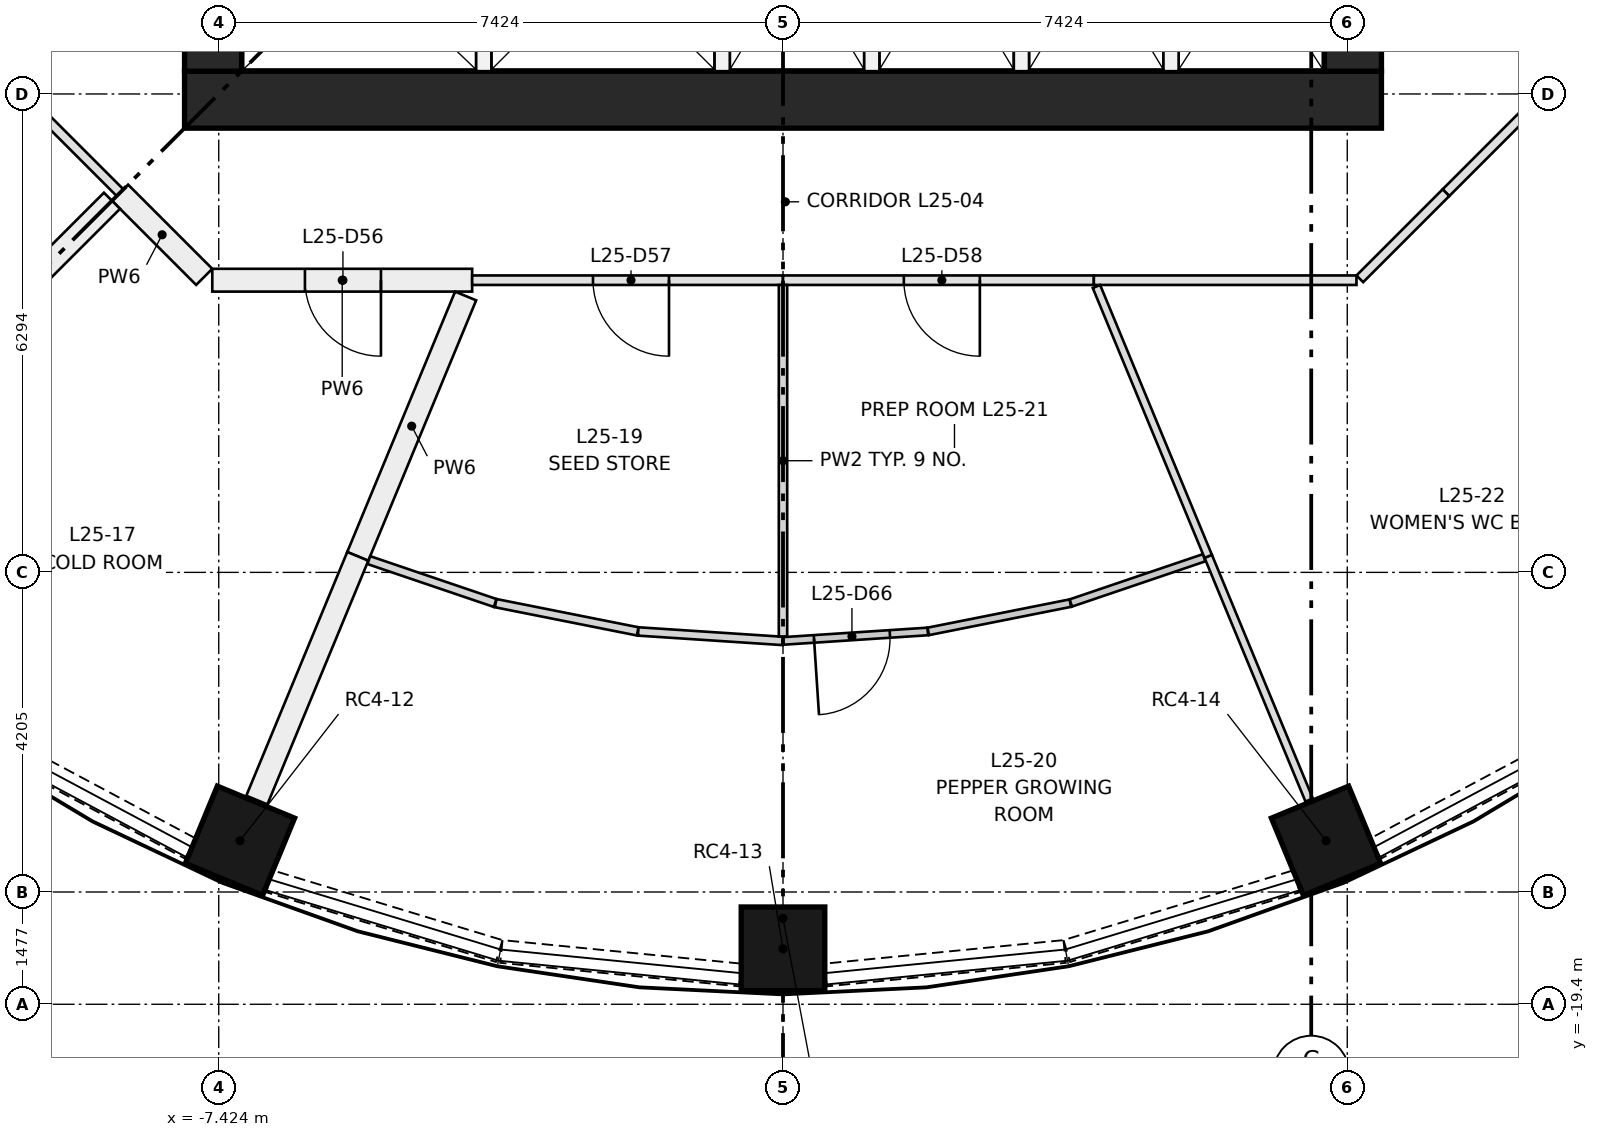
"""IFC4 building model, lengths in metres.
Left out: names, types, materials, properties, quantities, classifications, styles, units other than length and angle.
Written with IfcOpenShell. Run it as: python <this file> out.ifc"""

import sys

from ifc_helpers import new_model, si_unit, direction, frame, frame_2d, origin, origin_2d, place, context, subcontext, project, spatial, rectangle, extrude, element, fill, save


model = new_model("IFC4")
c1 = context("Model", 3, precision=1e-05, world=origin(), true_north=direction((0.0, 1.0)))
c2 = subcontext(c1, "Body", "Model", "MODEL_VIEW")
j1 = project(units=[si_unit("LENGTHUNIT", "METRE"), si_unit("PLANEANGLEUNIT", "RADIAN")], contexts=[c1])
p1 = place(None, origin())
s1 = spatial("IfcSite", under=j1, at=p1, CompositionType="ELEMENT")
p2 = place(p1, origin())
s2 = spatial("IfcBuilding", under=s1, at=p2, CompositionType="ELEMENT")
p3 = place(p2, frame((0.0, 0.0, 98.3)))
s3 = spatial("IfcBuildingStorey", under=s2, at=p3, CompositionType="ELEMENT", Elevation=98.3)
for number, where, z_axis, x_axis in (
    (1, (-7.145, -17.249, 0.0), (0.0, 0.0, 1.0), (-0.383, -0.924, 0.0)),
    (2, (0.0, -18.67, 0.0), (0.0, 0.0, 1.0), (0.0, -1.0, 0.0)),
    (3, (7.145, -17.249, 0.0), (0.0, 0.0, 1.0), (0.383, -0.924, 0.0)),
):
    element("IfcColumn", number, at=place(p3, frame(where, z_axis=z_axis, x_axis=x_axis)), inside=s3, PredefinedType="COLUMN", context=c2, shape_type="SweptSolid", body=[
        extrude(rectangle(XDim=1.1, YDim=1.1, at=origin_2d()), origin(), (0.0, 0.0, 1.0), 3.65),
    ])
p4 = place(p3, frame((-7.874, -7.499, 0.0), z_axis=(0.0, 0.0, 1.0), x_axis=(1.0, 0.0, 0.0)))
e4 = element("IfcWall", 4, at=p4, inside=s3, PredefinedType="SHEAR", context=c2, shape_type="SweptSolid", body=[
    extrude(rectangle(XDim=15.748, YDim=0.75, at=frame_2d((7.874, 0.0))), origin(), (0.0, 0.0, 1.0), 3.65),
])
p5 = place(p3, frame((-7.499, -7.124, 0.0), z_axis=(0.0, 0.0, 1.0), x_axis=(0.0, 1.0, 0.0)))
e5 = element("IfcWall", 5, at=p5, inside=s3, PredefinedType="SHEAR", context=c2, shape_type="SweptSolid", body=[
    extrude(rectangle(XDim=14.248, YDim=0.75, at=frame_2d((7.124, 0.0))), origin(), (0.0, 0.0, 1.0), 3.65),
])
p6 = place(p5, frame((6.624, 0.0, 0.0)))
e6 = element("IfcOpeningElement", 6, at=p6, cuts=e5, PredefinedType="OPENING", context=c2, shape_type="SweptSolid", body=[
    extrude(rectangle(XDim=1.0, YDim=2.1, at=frame_2d((0.5, 1.05))), frame((0.0, 0.385, 0.0), z_axis=(0.0, -1.0, 0.0), x_axis=(1.0, 0.0, 0.0)), (0.0, 0.0, 1.0), 0.77),
])
p7 = place(p5, frame((3.5, 0.0, 0.0)))
e7 = element("IfcOpeningElement", 7, at=p7, cuts=e5, PredefinedType="OPENING", context=c2, shape_type="SweptSolid", body=[
    extrude(rectangle(XDim=1.8, YDim=2.1, at=frame_2d((0.9, 1.05))), frame((0.0, 0.385, 0.0), z_axis=(0.0, -1.0, 0.0), x_axis=(1.0, 0.0, 0.0)), (0.0, 0.0, 1.0), 0.77),
])
p8 = place(p5, frame((8.948, 0.0, 0.0)))
e8 = element("IfcOpeningElement", 8, at=p8, cuts=e5, PredefinedType="OPENING", context=c2, shape_type="SweptSolid", body=[
    extrude(rectangle(XDim=1.8, YDim=2.1, at=frame_2d((0.9, 1.05))), frame((0.0, 0.385, 0.0), z_axis=(0.0, -1.0, 0.0), x_axis=(1.0, 0.0, 0.0)), (0.0, 0.0, 1.0), 0.77),
])
p9 = place(p5, frame((12.124, 0.0, 0.0)))
e9 = element("IfcOpeningElement", 9, at=p9, cuts=e5, PredefinedType="OPENING", context=c2, shape_type="SweptSolid", body=[
    extrude(rectangle(XDim=1.0, YDim=2.1, at=frame_2d((0.5, 1.05))), frame((0.0, 0.385, 0.0), z_axis=(0.0, -1.0, 0.0), x_axis=(1.0, 0.0, 0.0)), (0.0, 0.0, 1.0), 0.77),
])
p10 = place(p3, frame((7.499, -7.124, 0.0), z_axis=(0.0, 0.0, 1.0), x_axis=(0.0, 1.0, 0.0)))
e10 = element("IfcWall", 10, at=p10, inside=s3, PredefinedType="SHEAR", context=c2, shape_type="SweptSolid", body=[
    extrude(rectangle(XDim=14.248, YDim=0.75, at=frame_2d((7.124, 0.0))), origin(), (0.0, 0.0, 1.0), 3.65),
])
p11 = place(p10, frame((6.624, 0.0, 0.0)))
e11 = element("IfcOpeningElement", 11, at=p11, cuts=e10, PredefinedType="OPENING", context=c2, shape_type="SweptSolid", body=[
    extrude(rectangle(XDim=1.0, YDim=2.1, at=frame_2d((0.5, 1.05))), frame((0.0, 0.385, 0.0), z_axis=(0.0, -1.0, 0.0), x_axis=(1.0, 0.0, 0.0)), (0.0, 0.0, 1.0), 0.77),
])
p12 = place(p10, frame((3.5, 0.0, 0.0)))
e12 = element("IfcOpeningElement", 12, at=p12, cuts=e10, PredefinedType="OPENING", context=c2, shape_type="SweptSolid", body=[
    extrude(rectangle(XDim=1.8, YDim=2.1, at=frame_2d((0.9, 1.05))), frame((0.0, 0.385, 0.0), z_axis=(0.0, -1.0, 0.0), x_axis=(1.0, 0.0, 0.0)), (0.0, 0.0, 1.0), 0.77),
])
p13 = place(p10, frame((8.948, 0.0, 0.0)))
e13 = element("IfcOpeningElement", 13, at=p13, cuts=e10, PredefinedType="OPENING", context=c2, shape_type="SweptSolid", body=[
    extrude(rectangle(XDim=1.8, YDim=2.1, at=frame_2d((0.9, 1.05))), frame((0.0, 0.385, 0.0), z_axis=(0.0, -1.0, 0.0), x_axis=(1.0, 0.0, 0.0)), (0.0, 0.0, 1.0), 0.77),
])
for number, where, z_axis, x_axis in (
    (14, (-3.937, -7.124, 0.0), (0.0, 0.0, 1.0), (0.0, 1.0, 0.0)),
    (15, (-0.8, -7.124, 0.0), (0.0, 0.0, 1.0), (0.0, 1.0, 0.0)),
    (16, (1.168, -7.124, 0.0), (0.0, 0.0, 1.0), (0.0, 1.0, 0.0)),
    (17, (3.137, -7.124, 0.0), (0.0, 0.0, 1.0), (0.0, 1.0, 0.0)),
    (18, (5.105, -7.124, 0.0), (0.0, 0.0, 1.0), (0.0, 1.0, 0.0)),
):
    element("IfcWall", number, at=place(p3, frame(where, z_axis=z_axis, x_axis=x_axis)), inside=s3, PredefinedType="PARTITIONING", context=c2, shape_type="SweptSolid", body=[
        extrude(rectangle(XDim=2.95, YDim=0.2, at=frame_2d((1.475, 0.0))), origin(), (0.0, 0.0, 1.0), 3.3),
    ])
p14 = place(p3, frame((-10.582, -15.863, 0.0), z_axis=(0.0, 0.0, 1.0), x_axis=(0.882005928597, -0.471238306932, 0.0)))
e19 = element("IfcWall", 19, at=p14, inside=s3, PredefinedType="SOLIDWALL", context=c2, shape_type="SweptSolid", body=[
    extrude(rectangle(XDim=3.157, YDim=0.3, at=frame_2d((1.579, 0.0))), origin(), (0.0, 0.0, 1.0), 0.9),
])
p15 = place(p3, frame((-6.756, -17.782, 0.0), z_axis=(0.0, 0.0, 1.0), x_axis=(0.956874051907, -0.290503096001, 0.0)))
e20 = element("IfcWall", 20, at=p15, inside=s3, PredefinedType="SOLIDWALL", context=c2, shape_type="SweptSolid", body=[
    extrude(rectangle(XDim=3.157, YDim=0.3, at=frame_2d((1.579, 0.0))), origin(), (0.0, 0.0, 1.0), 0.9),
])
for number, where, z_axis, x_axis in (
    (21, (-3.705, -18.706, 0.0), (0.0, 0.0, 1.0), (0.995, -0.098, 0.0)),
    (22, (0.564, -19.014, 0.0), (0.0, 0.0, 1.0), (0.995, 0.098, 0.0)),
):
    element("IfcWall", number, at=place(p3, frame(where, z_axis=z_axis, x_axis=x_axis)), inside=s3, PredefinedType="SOLIDWALL", context=c2, shape_type="SweptSolid", body=[
        extrude(rectangle(XDim=3.156, YDim=0.3, at=frame_2d((1.578, 0.0))), origin(), (0.0, 0.0, 1.0), 0.9),
    ])
p16 = place(p3, frame((3.734, -18.7, 0.0), z_axis=(0.0, 0.0, 1.0), x_axis=(0.956874051907, 0.290503096001, 0.0)))
e23 = element("IfcWall", 23, at=p16, inside=s3, PredefinedType="SOLIDWALL", context=c2, shape_type="SweptSolid", body=[
    extrude(rectangle(XDim=3.157, YDim=0.3, at=frame_2d((1.579, 0.0))), origin(), (0.0, 0.0, 1.0), 0.9),
])
p17 = place(p3, frame((7.797, -17.351, 0.0), z_axis=(0.0, 0.0, 1.0), x_axis=(0.882005928597, 0.471238306932, 0.0)))
e24 = element("IfcWall", 24, at=p17, inside=s3, PredefinedType="SOLIDWALL", context=c2, shape_type="SweptSolid", body=[
    extrude(rectangle(XDim=3.157, YDim=0.3, at=frame_2d((1.579, 0.0))), origin(), (0.0, 0.0, 1.0), 0.9),
])
for number, where, z_axis, x_axis in (
    (25, (9.856, -7.589, 0.0), (0.0, 0.0, 1.0), (-0.707, -0.707, 0.0)),
    (26, (-8.722, -8.722, 0.0), (0.0, 0.0, 1.0), (-0.707, 0.707, 0.0)),
):
    element("IfcWall", number, at=place(p3, frame(where, z_axis=z_axis, x_axis=x_axis)), inside=s3, PredefinedType="PARTITIONING", context=c2, shape_type="SweptSolid", body=[
        extrude(rectangle(XDim=1.603, YDim=0.125, at=frame_2d((0.801, 0.0))), origin(), (0.0, 0.0, 1.0), 3.3),
    ])
p18 = place(p3, frame((-7.615, -9.83, 0.0), z_axis=(0.0, 0.0, 1.0), x_axis=(-0.707028841614, 0.70718471217, 0.0)))
e27 = element("IfcWall", 27, at=p18, inside=s3, PredefinedType="PARTITIONING", context=c2, shape_type="SweptSolid", body=[
    extrude(rectangle(XDim=1.566, YDim=0.3, at=frame_2d((0.783, 0.0))), origin(), (0.0, 0.0, 1.0), 3.3),
])
p19 = place(p3, frame((-4.09, -9.874, 0.0), z_axis=(0.0, 0.0, 1.0), x_axis=(-1.0, 0.0, 0.0)))
e28 = element("IfcWall", 28, at=p19, inside=s3, PredefinedType="PARTITIONING", context=c2, shape_type="SweptSolid", body=[
    extrude(rectangle(XDim=3.419, YDim=0.3, at=frame_2d((1.709, 0.0))), origin(), (0.0, 0.0, 1.0), 3.3),
])
p20 = place(p19, frame((1.2, 0.0, 0.0)))
e29 = element("IfcOpeningElement", 29, at=p20, cuts=e28, PredefinedType="OPENING", context=c2, shape_type="SweptSolid", body=[
    extrude(rectangle(XDim=1.0, YDim=2.1, at=frame_2d((0.5, 1.05))), frame((0.0, 0.16, 0.0), z_axis=(0.0, -1.0, 0.0), x_axis=(1.0, 0.0, 0.0)), (0.0, 0.0, 1.0), 0.32),
])
p21 = place(p3, frame((0.0, -9.874, 0.0), z_axis=(0.0, 0.0, 1.0), x_axis=(-1.0, 0.0, 0.0)))
e30 = element("IfcWall", 30, at=p21, inside=s3, PredefinedType="PARTITIONING", context=c2, shape_type="SweptSolid", body=[
    extrude(rectangle(XDim=4.09, YDim=0.125, at=frame_2d((2.045, 0.0))), origin(), (0.0, 0.0, 1.0), 3.3),
])
p22 = place(p21, frame((1.5, 0.0, 0.0)))
e31 = element("IfcOpeningElement", 31, at=p22, cuts=e30, PredefinedType="OPENING", context=c2, shape_type="SweptSolid", body=[
    extrude(rectangle(XDim=1.0, YDim=2.1, at=frame_2d((0.5, 1.05))), frame((0.0, 0.073, 0.0), z_axis=(0.0, -1.0, 0.0), x_axis=(1.0, 0.0, 0.0)), (0.0, 0.0, 1.0), 0.145),
])
p23 = place(p3, frame((4.09, -9.874, 0.0), z_axis=(0.0, 0.0, 1.0), x_axis=(-1.0, 0.0, 0.0)))
e32 = element("IfcWall", 32, at=p23, inside=s3, PredefinedType="PARTITIONING", context=c2, shape_type="SweptSolid", body=[
    extrude(rectangle(XDim=4.09, YDim=0.125, at=frame_2d((2.045, 0.0))), origin(), (0.0, 0.0, 1.0), 3.3),
])
p24 = place(p23, frame((1.5, 0.0, 0.0)))
e33 = element("IfcOpeningElement", 33, at=p24, cuts=e32, PredefinedType="OPENING", context=c2, shape_type="SweptSolid", body=[
    extrude(rectangle(XDim=1.0, YDim=2.1, at=frame_2d((0.5, 1.05))), frame((0.0, 0.073, 0.0), z_axis=(0.0, -1.0, 0.0), x_axis=(1.0, 0.0, 0.0)), (0.0, 0.0, 1.0), 0.145),
])
p25 = place(p3, frame((7.545, -9.874, 0.0), z_axis=(0.0, 0.0, 1.0), x_axis=(-1.0, 0.0, 0.0)))
e34 = element("IfcWall", 34, at=p25, inside=s3, PredefinedType="PARTITIONING", context=c2, shape_type="SweptSolid", body=[
    extrude(rectangle(XDim=3.455, YDim=0.125, at=frame_2d((1.728, 0.0))), origin(), (0.0, 0.0, 1.0), 3.3),
])
p26 = place(p3, frame((8.722, -8.722, 0.0), z_axis=(0.0, 0.0, 1.0), x_axis=(-0.707030604857, -0.70718294931, 0.0)))
e35 = element("IfcWall", 35, at=p26, inside=s3, PredefinedType="PARTITIONING", context=c2, shape_type="SweptSolid", body=[
    extrude(rectangle(XDim=1.603, YDim=0.125, at=frame_2d((0.801, 0.0))), origin(), (0.0, 0.0, 1.0), 3.3),
])
p27 = place(p3, frame((-12.792, -12.792, 0.0), z_axis=(0.0, 0.0, 1.0), x_axis=(0.707106781187, 0.707106781187, 0.0)))
e36 = element("IfcWall", 36, at=p27, inside=s3, PredefinedType="PARTITIONING", context=c2, shape_type="SweptSolid", body=[
    extrude(rectangle(XDim=5.604, YDim=0.3, at=frame_2d((2.802, 0.0))), origin(), (0.0, 0.0, 1.0), 3.3),
])
p28 = place(p3, frame((-4.176, -10.081, 0.0), z_axis=(0.0, 0.0, 1.0), x_axis=(-0.382669680004, -0.923885228806, 0.0)))
e37 = element("IfcWall", 37, at=p28, inside=s3, PredefinedType="PARTITIONING", context=c2, shape_type="SweptSolid", body=[
    extrude(rectangle(XDim=3.708, YDim=0.3, at=frame_2d((1.854, 0.0))), origin(), (0.0, 0.0, 1.0), 3.3),
])
p29 = place(p3, frame((-5.595, -13.507, 0.0), z_axis=(0.0, 0.0, 1.0), x_axis=(-0.382681133009, -0.923880484932, 0.0)))
e38 = element("IfcWall", 38, at=p29, inside=s3, PredefinedType="PARTITIONING", context=c2, shape_type="SweptSolid", body=[
    extrude(rectangle(XDim=3.47, YDim=0.3, at=frame_2d((1.735, 0.0))), origin(), (0.0, 0.0, 1.0), 3.3),
])
p30 = place(p3, frame((-3.787, -14.121, 0.0), z_axis=(0.0, 0.0, 1.0), x_axis=(-0.946943921292, 0.321398833116, 0.0)))
e39 = element("IfcWall", 39, at=p30, inside=s3, PredefinedType="PARTITIONING", context=c2, shape_type="SweptSolid", body=[
    extrude(rectangle(XDim=1.755, YDim=0.11, at=frame_2d((0.877, 0.0))), origin(), (0.0, 0.0, 1.0), 3.3),
])
p31 = place(p3, frame((-1.912, -14.494, 0.0), z_axis=(0.0, 0.0, 1.0), x_axis=(-0.980796931486, 0.195031738924, 0.0)))
e40 = element("IfcWall", 40, at=p31, inside=s3, PredefinedType="PARTITIONING", context=c2, shape_type="SweptSolid", body=[
    extrude(rectangle(XDim=1.905, YDim=0.11, at=frame_2d((0.953, 0.0))), origin(), (0.0, 0.0, 1.0), 3.3),
])
p32 = place(p3, frame((0.0, -14.62, 0.0), z_axis=(0.0, 0.0, 1.0), x_axis=(-0.997853662235, 0.065483347227, 0.0)))
e41 = element("IfcWall", 41, at=p32, inside=s3, PredefinedType="PARTITIONING", context=c2, shape_type="SweptSolid", body=[
    extrude(rectangle(XDim=1.909, YDim=0.11, at=frame_2d((0.955, 0.0))), origin(), (0.0, 0.0, 1.0), 3.3),
])
p33 = place(p3, frame((0.0, -9.937, 0.0), z_axis=(0.0, 0.0, 1.0), x_axis=(0.0, -1.0, 0.0)))
e42 = element("IfcWall", 42, at=p33, inside=s3, PredefinedType="PARTITIONING", context=c2, shape_type="SweptSolid", body=[
    extrude(rectangle(XDim=4.625, YDim=0.11, at=frame_2d((2.312, 0.0))), origin(), (0.0, 0.0, 1.0), 3.3),
])
p34 = place(p3, frame((1.905, -14.495, 0.0), z_axis=(0.0, 0.0, 1.0), x_axis=(-0.997854210562, -0.065474991133, 0.0)))
e43 = element("IfcWall", 43, at=p34, inside=s3, PredefinedType="PARTITIONING", context=c2, shape_type="SweptSolid", body=[
    extrude(rectangle(XDim=1.909, YDim=0.1, at=frame_2d((0.955, 0.0))), origin(), (0.0, 0.0, 1.0), 3.3),
])
p35 = place(p34, frame((0.5, 0.0, 0.0)))
e44 = element("IfcOpeningElement", 44, at=p35, cuts=e43, PredefinedType="OPENING", context=c2, shape_type="SweptSolid", body=[
    extrude(rectangle(XDim=1.0, YDim=2.1, at=frame_2d((0.5, 1.05))), frame((0.0, 0.06, 0.0), z_axis=(0.0, -1.0, 0.0), x_axis=(1.0, 0.0, 0.0)), (0.0, 0.0, 1.0), 0.12),
])
p36 = place(p3, frame((1.912, -14.494, 0.0), z_axis=(0.0, 0.0, 1.0), x_axis=(0.980757648215, 0.195229187027, 0.0)))
e45 = element("IfcWall", 45, at=p36, inside=s3, PredefinedType="PARTITIONING", context=c2, shape_type="SweptSolid", body=[
    extrude(rectangle(XDim=1.906, YDim=0.1, at=frame_2d((0.953, 0.0))), origin(), (0.0, 0.0, 1.0), 3.3),
])
p37 = place(p3, frame((3.787, -14.121, 0.0), z_axis=(0.0, 0.0, 1.0), x_axis=(0.946970110486, 0.321321661029, 0.0)))
e46 = element("IfcWall", 46, at=p37, inside=s3, PredefinedType="PARTITIONING", context=c2, shape_type="SweptSolid", body=[
    extrude(rectangle(XDim=1.853, YDim=0.1, at=frame_2d((0.927, 0.0))), origin(), (0.0, 0.0, 1.0), 3.3),
])
p38 = place(p3, frame((5.595, -13.507, 0.0), z_axis=(0.0, 0.0, 1.0), x_axis=(0.382681133009, -0.923880484932, 0.0)))
e47 = element("IfcWall", 47, at=p38, inside=s3, PredefinedType="PARTITIONING", context=c2, shape_type="SweptSolid", body=[
    extrude(rectangle(XDim=3.47, YDim=0.105, at=frame_2d((1.735, 0.0))), origin(), (0.0, 0.0, 1.0), 3.3),
])
p39 = place(p3, frame((4.124, -9.957, 0.0), z_axis=(0.0, 0.0, 1.0), x_axis=(0.382688429768, -0.923877462503, 0.0)))
e48 = element("IfcWall", 48, at=p39, inside=s3, PredefinedType="PARTITIONING", context=c2, shape_type="SweptSolid", body=[
    extrude(rectangle(XDim=3.843, YDim=0.105, at=frame_2d((1.921, 0.0))), origin(), (0.0, 0.0, 1.0), 3.3),
])
p40 = place(p20, origin())
e49 = element("IfcDoor", 49, at=p40, inside=s3, OperationType="SINGLE_SWING_LEFT", PredefinedType="DOOR", context=c2, shape_type="SweptSolid", body=[
    extrude(rectangle(XDim=1.0, YDim=2.1, at=frame_2d((0.5, 1.05))), frame((0.0, 0.025, 0.0), z_axis=(0.0, -1.0, 0.0), x_axis=(1.0, 0.0, 0.0)), (0.0, 0.0, 1.0), 0.05),
])
fill(e29, e49)
p41 = place(p22, origin())
e50 = element("IfcDoor", 50, at=p41, inside=s3, OperationType="SINGLE_SWING_LEFT", PredefinedType="DOOR", context=c2, shape_type="SweptSolid", body=[
    extrude(rectangle(XDim=1.0, YDim=2.1, at=frame_2d((0.5, 1.05))), frame((0.0, 0.025, 0.0), z_axis=(0.0, -1.0, 0.0), x_axis=(1.0, 0.0, 0.0)), (0.0, 0.0, 1.0), 0.05),
])
fill(e31, e50)
p42 = place(p24, origin())
e51 = element("IfcDoor", 51, at=p42, inside=s3, OperationType="SINGLE_SWING_LEFT", PredefinedType="DOOR", context=c2, shape_type="SweptSolid", body=[
    extrude(rectangle(XDim=1.0, YDim=2.1, at=frame_2d((0.5, 1.05))), frame((0.0, 0.025, 0.0), z_axis=(0.0, -1.0, 0.0), x_axis=(1.0, 0.0, 0.0)), (0.0, 0.0, 1.0), 0.05),
])
fill(e33, e51)
p43 = place(p35, origin())
e52 = element("IfcDoor", 52, at=p43, inside=s3, OperationType="SINGLE_SWING_RIGHT", PredefinedType="DOOR", context=c2, shape_type="SweptSolid", body=[
    extrude(rectangle(XDim=1.0, YDim=2.1, at=frame_2d((0.5, 1.05))), frame((0.0, 0.025, 0.0), z_axis=(0.0, -1.0, 0.0), x_axis=(1.0, 0.0, 0.0)), (0.0, 0.0, 1.0), 0.05),
])
fill(e44, e52)
save(model, sys.argv[1])
